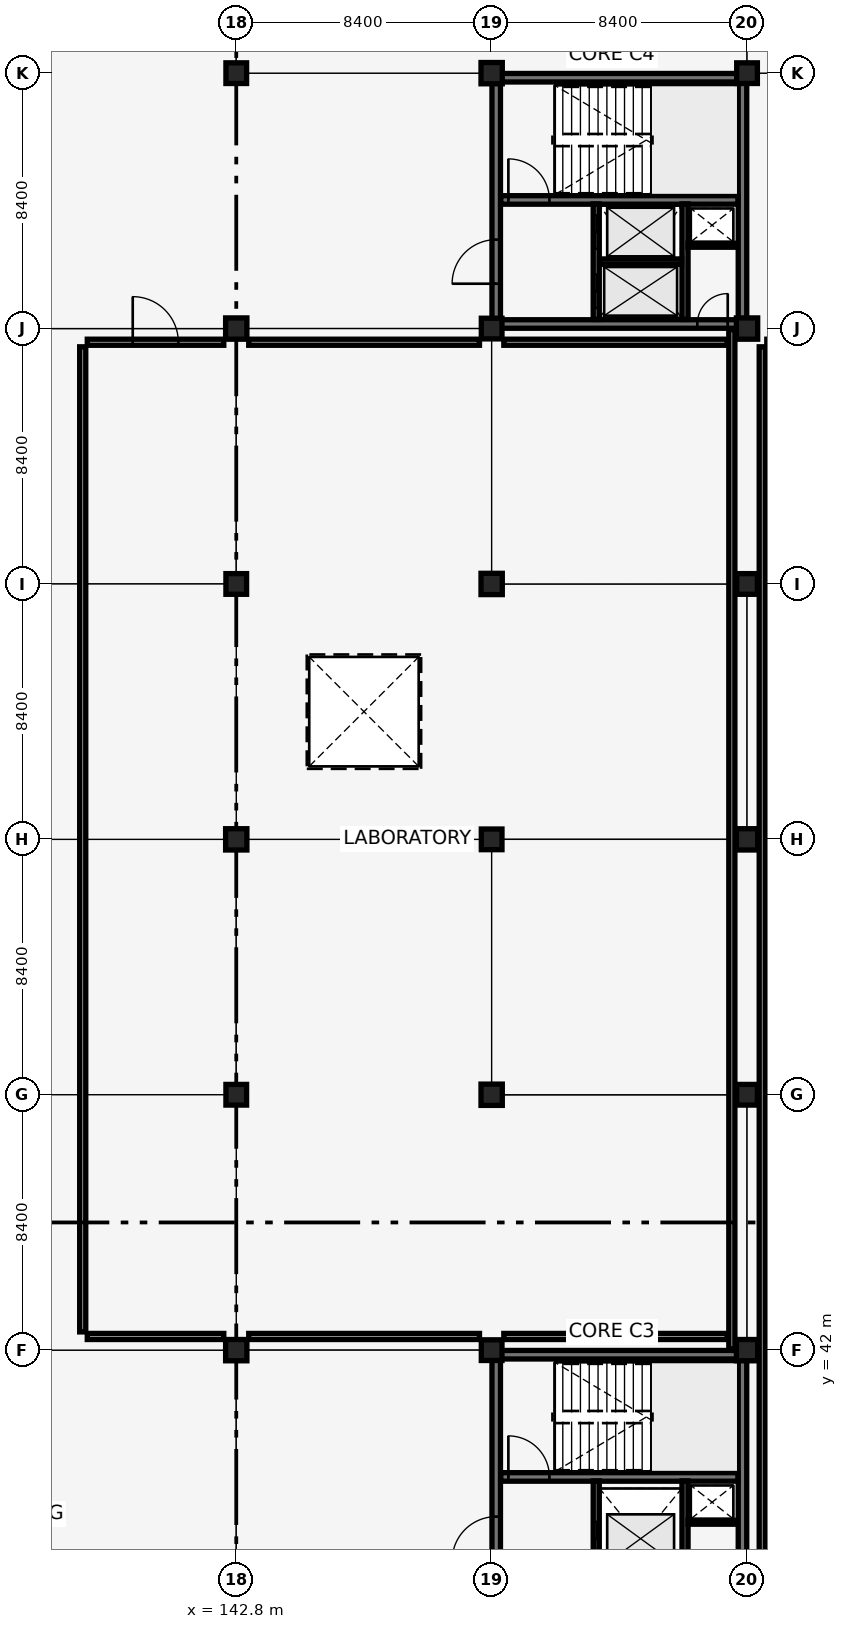
"""IFC4 building model, lengths in metres.
Left out: names, types, materials, properties, quantities, classifications, styles, units other than length and angle.
Written with IfcOpenShell. Run it as: python <this file> out.ifc"""

import sys

from ifc_helpers import new_model, si_unit, direction, frame, frame_2d, origin, origin_2d, place, context, subcontext, project, spatial, rectangle, extrude, element, fill, save


model = new_model("IFC4")
c1 = context("Model", 3, precision=1e-05, world=origin(), true_north=direction((0.0, 1.0)))
c2 = subcontext(c1, "Body", "Model", "MODEL_VIEW")
j1 = project(units=[si_unit("LENGTHUNIT", "METRE"), si_unit("PLANEANGLEUNIT", "RADIAN")], contexts=[c1])
p1 = place(None, origin())
s1 = spatial("IfcSite", under=j1, at=p1, CompositionType="ELEMENT")
p2 = place(p1, origin())
s2 = spatial("IfcBuilding", under=s1, at=p2, CompositionType="ELEMENT")
p3 = place(p2, frame((0.0, 0.0, 9.86)))
s3 = spatial("IfcBuildingStorey", under=s2, at=p3, CompositionType="ELEMENT", Elevation=9.86)
p4 = place(p3, frame((151.35, 41.85, 0.0), z_axis=(0.0, 0.0, 1.0), x_axis=(1.0, 0.0, 0.0)))
e1 = element("IfcWall", 1, at=p4, inside=s3, PredefinedType="SHEAR", context=c2, shape_type="SweptSolid", body=[
    extrude(rectangle(XDim=8.1, YDim=0.28, at=frame_2d((4.05, 0.0))), origin(), (0.0, 0.0, 1.0), 3.78),
])
p5 = place(p3, frame((151.35, 33.75, 0.0), z_axis=(0.0, 0.0, 1.0), x_axis=(0.0, 1.0, 0.0)))
e2 = element("IfcWall", 2, at=p5, inside=s3, PredefinedType="SHEAR", context=c2, shape_type="SweptSolid", body=[
    extrude(rectangle(XDim=8.1, YDim=0.28, at=frame_2d((4.05, 0.0))), origin(), (0.0, 0.0, 1.0), 3.78),
])
p6 = place(p5, frame((1.325, 0.0, 0.0)))
e3 = element("IfcOpeningElement", 3, at=p6, cuts=e2, PredefinedType="OPENING", context=c2, shape_type="SweptSolid", body=[
    extrude(rectangle(XDim=1.45, YDim=2.15, at=frame_2d((0.725, 1.075))), frame((0.0, 0.15, 0.0), z_axis=(0.0, -1.0, 0.0), x_axis=(1.0, 0.0, 0.0)), (0.0, 0.0, 1.0), 0.3),
])
p7 = place(p3, frame((159.45, 33.75, 0.0), z_axis=(0.0, 0.0, 1.0), x_axis=(0.0, 1.0, 0.0)))
e4 = element("IfcWall", 4, at=p7, inside=s3, PredefinedType="SHEAR", context=c2, shape_type="SweptSolid", body=[
    extrude(rectangle(XDim=8.1, YDim=0.28, at=frame_2d((4.05, 0.0))), origin(), (0.0, 0.0, 1.0), 3.78),
])
p8 = place(p3, frame((151.5, 37.83, 0.0), z_axis=(0.0, 0.0, 1.0), x_axis=(1.0, 0.0, 0.0)))
e5 = element("IfcWall", 5, at=p8, inside=s3, PredefinedType="SHEAR", context=c2, shape_type="SweptSolid", body=[
    extrude(rectangle(XDim=7.8, YDim=0.28, at=frame_2d((3.9, 0.0))), origin(), (0.0, 0.0, 1.0), 3.78),
])
p9 = place(p8, frame((0.25, 0.0, 0.0)))
e6 = element("IfcOpeningElement", 6, at=p9, cuts=e5, PredefinedType="OPENING", context=c2, shape_type="SweptSolid", body=[
    extrude(rectangle(XDim=1.35, YDim=2.15, at=frame_2d((0.675, 1.075))), frame((0.0, 0.15, 0.0), z_axis=(0.0, -1.0, 0.0), x_axis=(1.0, 0.0, 0.0)), (0.0, 0.0, 1.0), 0.3),
])
p10 = place(p3, frame((151.35, 75.75, 0.0), z_axis=(0.0, 0.0, 1.0), x_axis=(1.0, 0.0, 0.0)))
e7 = element("IfcWall", 7, at=p10, inside=s3, PredefinedType="SHEAR", context=c2, shape_type="SweptSolid", body=[
    extrude(rectangle(XDim=8.1, YDim=0.28, at=frame_2d((4.05, 0.0))), origin(), (0.0, 0.0, 1.0), 3.78),
])
p11 = place(p10, frame((6.615, 0.0, 0.0)))
e8 = element("IfcOpeningElement", 8, at=p11, cuts=e7, PredefinedType="OPENING", context=c2, shape_type="SweptSolid", body=[
    extrude(rectangle(XDim=1.0, YDim=2.15, at=frame_2d((0.5, 1.075))), frame((0.0, 0.15, 0.0), z_axis=(0.0, -1.0, 0.0), x_axis=(1.0, 0.0, 0.0)), (0.0, 0.0, 1.0), 0.3),
])
p12 = place(p3, frame((151.35, 83.85, 0.0), z_axis=(0.0, 0.0, 1.0), x_axis=(1.0, 0.0, 0.0)))
e9 = element("IfcWall", 9, at=p12, inside=s3, PredefinedType="SHEAR", context=c2, shape_type="SweptSolid", body=[
    extrude(rectangle(XDim=8.1, YDim=0.28, at=frame_2d((4.05, 0.0))), origin(), (0.0, 0.0, 1.0), 3.78),
])
p13 = place(p3, frame((151.35, 75.75, 0.0), z_axis=(0.0, 0.0, 1.0), x_axis=(0.0, 1.0, 0.0)))
e10 = element("IfcWall", 10, at=p13, inside=s3, PredefinedType="SHEAR", context=c2, shape_type="SweptSolid", body=[
    extrude(rectangle(XDim=8.1, YDim=0.28, at=frame_2d((4.05, 0.0))), origin(), (0.0, 0.0, 1.0), 3.78),
])
p14 = place(p13, frame((1.325, 0.0, 0.0)))
e11 = element("IfcOpeningElement", 11, at=p14, cuts=e10, PredefinedType="OPENING", context=c2, shape_type="SweptSolid", body=[
    extrude(rectangle(XDim=1.45, YDim=2.15, at=frame_2d((0.725, 1.075))), frame((0.0, 0.15, 0.0), z_axis=(0.0, -1.0, 0.0), x_axis=(1.0, 0.0, 0.0)), (0.0, 0.0, 1.0), 0.3),
])
p15 = place(p3, frame((159.45, 75.75, 0.0), z_axis=(0.0, 0.0, 1.0), x_axis=(0.0, 1.0, 0.0)))
e12 = element("IfcWall", 12, at=p15, inside=s3, PredefinedType="SHEAR", context=c2, shape_type="SweptSolid", body=[
    extrude(rectangle(XDim=8.1, YDim=0.28, at=frame_2d((4.05, 0.0))), origin(), (0.0, 0.0, 1.0), 3.78),
])
p16 = place(p3, frame((151.5, 79.83, 0.0), z_axis=(0.0, 0.0, 1.0), x_axis=(1.0, 0.0, 0.0)))
e13 = element("IfcWall", 13, at=p16, inside=s3, PredefinedType="SHEAR", context=c2, shape_type="SweptSolid", body=[
    extrude(rectangle(XDim=7.8, YDim=0.28, at=frame_2d((3.9, 0.0))), origin(), (0.0, 0.0, 1.0), 3.78),
])
p17 = place(p16, frame((0.25, 0.0, 0.0)))
e14 = element("IfcOpeningElement", 14, at=p17, cuts=e13, PredefinedType="OPENING", context=c2, shape_type="SweptSolid", body=[
    extrude(rectangle(XDim=1.35, YDim=2.15, at=frame_2d((0.675, 1.075))), frame((0.0, 0.15, 0.0), z_axis=(0.0, -1.0, 0.0), x_axis=(1.0, 0.0, 0.0)), (0.0, 0.0, 1.0), 0.3),
])
p18 = place(p3, frame((142.8, 42.0, 0.0), z_axis=(0.0, 0.0, 1.0), x_axis=(1.0, 0.0, 0.0)))
e15 = element("IfcColumn", 15, at=p18, inside=s3, PredefinedType="COLUMN", context=c2, shape_type="SweptSolid", body=[
    extrude(rectangle(XDim=0.7, YDim=0.7, at=origin_2d()), origin(), (0.0, 0.0, 1.0), 3.78),
])
p19 = place(p3, frame((142.8, 50.4, 0.0), z_axis=(0.0, 0.0, 1.0), x_axis=(1.0, 0.0, 0.0)))
e16 = element("IfcColumn", 16, at=p19, inside=s3, PredefinedType="COLUMN", context=c2, shape_type="SweptSolid", body=[
    extrude(rectangle(XDim=0.68, YDim=0.68, at=origin_2d()), origin(), (0.0, 0.0, 1.0), 3.78),
])
p20 = place(p3, frame((142.8, 58.8, 0.0), z_axis=(0.0, 0.0, 1.0), x_axis=(1.0, 0.0, 0.0)))
e17 = element("IfcColumn", 17, at=p20, inside=s3, PredefinedType="COLUMN", context=c2, shape_type="SweptSolid", body=[
    extrude(rectangle(XDim=0.7, YDim=0.7, at=origin_2d()), origin(), (0.0, 0.0, 1.0), 3.78),
])
p21 = place(p3, frame((142.8, 67.2, 0.0), z_axis=(0.0, 0.0, 1.0), x_axis=(1.0, 0.0, 0.0)))
e18 = element("IfcColumn", 18, at=p21, inside=s3, PredefinedType="COLUMN", context=c2, shape_type="SweptSolid", body=[
    extrude(rectangle(XDim=0.68, YDim=0.68, at=origin_2d()), origin(), (0.0, 0.0, 1.0), 3.78),
])
p22 = place(p3, frame((142.8, 75.6, 0.0), z_axis=(0.0, 0.0, 1.0), x_axis=(1.0, 0.0, 0.0)))
e19 = element("IfcColumn", 19, at=p22, inside=s3, PredefinedType="COLUMN", context=c2, shape_type="SweptSolid", body=[
    extrude(rectangle(XDim=0.7, YDim=0.7, at=origin_2d()), origin(), (0.0, 0.0, 1.0), 3.78),
])
for number, where, z_axis, x_axis in (
    (20, (142.8, 84.0, 0.0), (0.0, 0.0, 1.0), (1.0, 0.0, 0.0)),
    (21, (151.2, 42.0, 0.0), (0.0, 0.0, 1.0), (1.0, 0.0, 0.0)),
):
    element("IfcColumn", number, at=place(p3, frame(where, z_axis=z_axis, x_axis=x_axis)), inside=s3, PredefinedType="COLUMN", context=c2, shape_type="SweptSolid", body=[
        extrude(rectangle(XDim=0.68, YDim=0.68, at=origin_2d()), origin(), (0.0, 0.0, 1.0), 3.78),
    ])
p23 = place(p3, frame((151.2, 50.4, 0.0), z_axis=(0.0, 0.0, 1.0), x_axis=(1.0, 0.0, 0.0)))
e22 = element("IfcColumn", 22, at=p23, inside=s3, PredefinedType="COLUMN", context=c2, shape_type="SweptSolid", body=[
    extrude(rectangle(XDim=0.7, YDim=0.7, at=origin_2d()), origin(), (0.0, 0.0, 1.0), 3.78),
])
p24 = place(p3, frame((151.2, 58.8, 0.0), z_axis=(0.0, 0.0, 1.0), x_axis=(1.0, 0.0, 0.0)))
e23 = element("IfcColumn", 23, at=p24, inside=s3, PredefinedType="COLUMN", context=c2, shape_type="SweptSolid", body=[
    extrude(rectangle(XDim=0.68, YDim=0.68, at=origin_2d()), origin(), (0.0, 0.0, 1.0), 3.78),
])
p25 = place(p3, frame((151.2, 67.2, 0.0), z_axis=(0.0, 0.0, 1.0), x_axis=(1.0, 0.0, 0.0)))
e24 = element("IfcColumn", 24, at=p25, inside=s3, PredefinedType="COLUMN", context=c2, shape_type="SweptSolid", body=[
    extrude(rectangle(XDim=0.7, YDim=0.7, at=origin_2d()), origin(), (0.0, 0.0, 1.0), 3.78),
])
p26 = place(p3, frame((151.2, 75.6, 0.0), z_axis=(0.0, 0.0, 1.0), x_axis=(1.0, 0.0, 0.0)))
e25 = element("IfcColumn", 25, at=p26, inside=s3, PredefinedType="COLUMN", context=c2, shape_type="SweptSolid", body=[
    extrude(rectangle(XDim=0.68, YDim=0.68, at=origin_2d()), origin(), (0.0, 0.0, 1.0), 3.78),
])
for number, where, z_axis, x_axis in (
    (26, (151.2, 84.0, 0.0), (0.0, 0.0, 1.0), (1.0, 0.0, 0.0)),
    (27, (159.6, 42.0, 0.0), (0.0, 0.0, 1.0), (1.0, 0.0, 0.0)),
):
    element("IfcColumn", number, at=place(p3, frame(where, z_axis=z_axis, x_axis=x_axis)), inside=s3, PredefinedType="COLUMN", context=c2, shape_type="SweptSolid", body=[
        extrude(rectangle(XDim=0.7, YDim=0.7, at=origin_2d()), origin(), (0.0, 0.0, 1.0), 3.78),
    ])
p27 = place(p3, frame((159.6, 50.4, 0.0), z_axis=(0.0, 0.0, 1.0), x_axis=(1.0, 0.0, 0.0)))
e28 = element("IfcColumn", 28, at=p27, inside=s3, PredefinedType="COLUMN", context=c2, shape_type="SweptSolid", body=[
    extrude(rectangle(XDim=0.68, YDim=0.68, at=origin_2d()), origin(), (0.0, 0.0, 1.0), 3.78),
])
p28 = place(p3, frame((159.6, 58.8, 0.0), z_axis=(0.0, 0.0, 1.0), x_axis=(1.0, 0.0, 0.0)))
e29 = element("IfcColumn", 29, at=p28, inside=s3, PredefinedType="COLUMN", context=c2, shape_type="SweptSolid", body=[
    extrude(rectangle(XDim=0.7, YDim=0.7, at=origin_2d()), origin(), (0.0, 0.0, 1.0), 3.78),
])
p29 = place(p3, frame((159.6, 67.2, 0.0), z_axis=(0.0, 0.0, 1.0), x_axis=(1.0, 0.0, 0.0)))
e30 = element("IfcColumn", 30, at=p29, inside=s3, PredefinedType="COLUMN", context=c2, shape_type="SweptSolid", body=[
    extrude(rectangle(XDim=0.68, YDim=0.68, at=origin_2d()), origin(), (0.0, 0.0, 1.0), 3.78),
])
p30 = place(p3, frame((159.6, 75.6, 0.0), z_axis=(0.0, 0.0, 1.0), x_axis=(1.0, 0.0, 0.0)))
e31 = element("IfcColumn", 31, at=p30, inside=s3, PredefinedType="COLUMN", context=c2, shape_type="SweptSolid", body=[
    extrude(rectangle(XDim=0.7, YDim=0.7, at=origin_2d()), origin(), (0.0, 0.0, 1.0), 3.78),
])
p31 = place(p3, frame((159.6, 84.0, 0.0), z_axis=(0.0, 0.0, 1.0), x_axis=(1.0, 0.0, 0.0)))
e32 = element("IfcColumn", 32, at=p31, inside=s3, PredefinedType="COLUMN", context=c2, shape_type="SweptSolid", body=[
    extrude(rectangle(XDim=0.68, YDim=0.68, at=origin_2d()), origin(), (0.0, 0.0, 1.0), 3.78),
])
p32 = place(p3, frame((154.64, 33.9, 0.0), z_axis=(0.0, 0.0, 1.0), x_axis=(0.0, 1.0, 0.0)))
e33 = element("IfcWall", 33, at=p32, inside=s3, PredefinedType="SHEAR", context=c2, shape_type="SweptSolid", body=[
    extrude(rectangle(XDim=3.8, YDim=0.2, at=frame_2d((1.9, 0.0))), origin(), (0.0, 0.0, 1.0), 2.91),
])
p33 = place(p32, frame((1.35, 0.0, 0.0)))
e34 = element("IfcOpeningElement", 34, at=p33, cuts=e33, PredefinedType="OPENING", context=c2, shape_type="SweptSolid", body=[
    extrude(rectangle(XDim=1.1, YDim=2.15, at=frame_2d((0.55, 1.075))), frame((0.0, 0.11, 0.0), z_axis=(0.0, -1.0, 0.0), x_axis=(1.0, 0.0, 0.0)), (0.0, 0.0, 1.0), 0.22),
])
p34 = place(p3, frame((157.56, 33.9, 0.0), z_axis=(0.0, 0.0, 1.0), x_axis=(0.0, 1.0, 0.0)))
e35 = element("IfcWall", 35, at=p34, inside=s3, PredefinedType="SHEAR", context=c2, shape_type="SweptSolid", body=[
    extrude(rectangle(XDim=3.8, YDim=0.2, at=frame_2d((1.9, 0.0))), origin(), (0.0, 0.0, 1.0), 2.91),
])
p35 = place(p3, frame((157.66, 36.34, 0.0), z_axis=(0.0, 0.0, 1.0), x_axis=(1.0, 0.0, 0.0)))
e36 = element("IfcWall", 36, at=p35, inside=s3, PredefinedType="PARTITIONING", context=c2, shape_type="SweptSolid", body=[
    extrude(rectangle(XDim=1.62, YDim=0.13, at=frame_2d((0.81, 0.0))), origin(), (0.0, 0.0, 1.0), 3.78),
])
p36 = place(p3, frame((154.64, 75.9, 0.0), z_axis=(0.0, 0.0, 1.0), x_axis=(0.0, 1.0, 0.0)))
e37 = element("IfcWall", 37, at=p36, inside=s3, PredefinedType="SHEAR", context=c2, shape_type="SweptSolid", body=[
    extrude(rectangle(XDim=3.8, YDim=0.2, at=frame_2d((1.9, 0.0))), origin(), (0.0, 0.0, 1.0), 2.95),
])
p37 = place(p36, frame((0.375, 0.0, 0.0)))
e38 = element("IfcOpeningElement", 38, at=p37, cuts=e37, PredefinedType="OPENING", context=c2, shape_type="SweptSolid", body=[
    extrude(rectangle(XDim=1.1, YDim=2.15, at=frame_2d((0.55, 1.075))), frame((0.0, 0.11, 0.0), z_axis=(0.0, -1.0, 0.0), x_axis=(1.0, 0.0, 0.0)), (0.0, 0.0, 1.0), 0.22),
])
p38 = place(p36, frame((2.325, 0.0, 0.0)))
e39 = element("IfcOpeningElement", 39, at=p38, cuts=e37, PredefinedType="OPENING", context=c2, shape_type="SweptSolid", body=[
    extrude(rectangle(XDim=1.1, YDim=2.15, at=frame_2d((0.55, 1.075))), frame((0.0, 0.11, 0.0), z_axis=(0.0, -1.0, 0.0), x_axis=(1.0, 0.0, 0.0)), (0.0, 0.0, 1.0), 0.22),
])
p39 = place(p3, frame((157.56, 75.9, 0.0), z_axis=(0.0, 0.0, 1.0), x_axis=(0.0, 1.0, 0.0)))
e40 = element("IfcWall", 40, at=p39, inside=s3, PredefinedType="SHEAR", context=c2, shape_type="SweptSolid", body=[
    extrude(rectangle(XDim=3.8, YDim=0.2, at=frame_2d((1.9, 0.0))), origin(), (0.0, 0.0, 1.0), 2.95),
])
p40 = place(p3, frame((154.75, 77.8, 0.0), z_axis=(0.0, 0.0, 1.0), x_axis=(1.0, 0.0, 0.0)))
e41 = element("IfcWall", 41, at=p40, inside=s3, PredefinedType="SHEAR", context=c2, shape_type="SweptSolid", body=[
    extrude(rectangle(XDim=2.7, YDim=0.18, at=frame_2d((1.35, 0.0))), origin(), (0.0, 0.0, 1.0), 3.78),
])
p41 = place(p3, frame((157.66, 78.34, 0.0), z_axis=(0.0, 0.0, 1.0), x_axis=(1.0, 0.0, 0.0)))
e42 = element("IfcWall", 42, at=p41, inside=s3, PredefinedType="PARTITIONING", context=c2, shape_type="SweptSolid", body=[
    extrude(rectangle(XDim=1.62, YDim=0.13, at=frame_2d((0.81, 0.0))), origin(), (0.0, 0.0, 1.0), 3.78),
])
p42 = place(p3, frame((137.9, 75.15, 0.0), z_axis=(0.0, 0.0, 1.0), x_axis=(1.0, 0.0, 0.0)))
e43 = element("IfcWall", 43, at=p42, inside=s3, PredefinedType="PARTITIONING", context=c2, shape_type="SweptSolid", body=[
    extrude(rectangle(XDim=4.49, YDim=0.2, at=frame_2d((2.245, 0.0))), origin(), (0.0, 0.0, 1.0), 3.78),
])
p43 = place(p42, frame((1.495, 0.0, 0.0)))
e44 = element("IfcOpeningElement", 44, at=p43, cuts=e43, PredefinedType="OPENING", context=c2, shape_type="SweptSolid", body=[
    extrude(rectangle(XDim=1.5, YDim=2.2, at=frame_2d((0.75, 1.1))), frame((0.0, 0.11, 0.0), z_axis=(0.0, -1.0, 0.0), x_axis=(1.0, 0.0, 0.0)), (0.0, 0.0, 1.0), 0.22),
])
p44 = place(p3, frame((143.21, 75.15, 0.0), z_axis=(0.0, 0.0, 1.0), x_axis=(1.0, 0.0, 0.0)))
e45 = element("IfcWall", 45, at=p44, inside=s3, PredefinedType="PARTITIONING", context=c2, shape_type="SweptSolid", body=[
    extrude(rectangle(XDim=7.59, YDim=0.2, at=frame_2d((3.795, 0.0))), origin(), (0.0, 0.0, 1.0), 3.78),
])
p45 = place(p3, frame((151.6, 75.15, 0.0), z_axis=(0.0, 0.0, 1.0), x_axis=(1.0, 0.0, 0.0)))
e46 = element("IfcWall", 46, at=p45, inside=s3, PredefinedType="PARTITIONING", context=c2, shape_type="SweptSolid", body=[
    extrude(rectangle(XDim=7.35, YDim=0.2, at=frame_2d((3.675, 0.0))), origin(), (0.0, 0.0, 1.0), 3.78),
])
p46 = place(p3, frame((137.75, 42.6, 0.0), z_axis=(0.0, 0.0, 1.0), x_axis=(0.0, 1.0, 0.0)))
e47 = element("IfcWall", 47, at=p46, inside=s3, PredefinedType="PARTITIONING", context=c2, shape_type="SweptSolid", body=[
    extrude(rectangle(XDim=32.4, YDim=0.2, at=frame_2d((16.2, 0.0))), origin(), (0.0, 0.0, 1.0), 2.91),
])
p47 = place(p3, frame((137.9, 42.45, 0.0), z_axis=(0.0, 0.0, 1.0), x_axis=(1.0, 0.0, 0.0)))
e48 = element("IfcWall", 48, at=p47, inside=s3, PredefinedType="PARTITIONING", context=c2, shape_type="SweptSolid", body=[
    extrude(rectangle(XDim=4.49, YDim=0.2, at=frame_2d((2.245, 0.0))), origin(), (0.0, 0.0, 1.0), 3.78),
])
p48 = place(p3, frame((143.21, 42.45, 0.0), z_axis=(0.0, 0.0, 1.0), x_axis=(1.0, 0.0, 0.0)))
e49 = element("IfcWall", 49, at=p48, inside=s3, PredefinedType="PARTITIONING", context=c2, shape_type="SweptSolid", body=[
    extrude(rectangle(XDim=7.59, YDim=0.2, at=frame_2d((3.795, 0.0))), origin(), (0.0, 0.0, 1.0), 3.78),
])
p49 = place(p3, frame((151.6, 42.45, 0.0), z_axis=(0.0, 0.0, 1.0), x_axis=(1.0, 0.0, 0.0)))
e50 = element("IfcWall", 50, at=p49, inside=s3, PredefinedType="PARTITIONING", context=c2, shape_type="SweptSolid", body=[
    extrude(rectangle(XDim=7.35, YDim=0.2, at=frame_2d((3.675, 0.0))), origin(), (0.0, 0.0, 1.0), 3.78),
])
p50 = place(p3, frame((159.1, 42.03, 0.0), z_axis=(0.0, 0.0, 1.0), x_axis=(0.0, 1.0, 0.0)))
e51 = element("IfcWall", 51, at=p50, inside=s3, PredefinedType="PARTITIONING", context=c2, shape_type="SweptSolid", body=[
    extrude(rectangle(XDim=33.54, YDim=0.2, at=frame_2d((16.77, 0.0))), origin(), (0.0, 0.0, 1.0), 2.91),
])
p51 = place(p3, frame((160.25, 75.15, 0.0), z_axis=(0.0, 0.0, 1.0), x_axis=(1.0, 0.0, 0.0)))
e52 = element("IfcWall", 52, at=p51, inside=s3, PredefinedType="PARTITIONING", context=c2, shape_type="SweptSolid", body=[
    extrude(rectangle(XDim=7.57, YDim=0.2, at=frame_2d((3.785, 0.0))), origin(), (0.0, 0.0, 1.0), 3.0),
])
p52 = place(p3, frame((160.1, 34.2, 0.0), z_axis=(0.0, 0.0, 1.0), x_axis=(0.0, 1.0, 0.0)))
e53 = element("IfcWall", 53, at=p52, inside=s3, PredefinedType="PARTITIONING", context=c2, shape_type="SweptSolid", body=[
    extrude(rectangle(XDim=40.8, YDim=0.2, at=frame_2d((20.4, 0.0))), origin(), (0.0, 0.0, 1.0), 2.91),
])
p53 = place(p9, origin())
e54 = element("IfcDoor", 54, at=p53, inside=s3, OperationType="SINGLE_SWING_LEFT", PredefinedType="DOOR", context=c2, shape_type="SweptSolid", body=[
    extrude(rectangle(XDim=1.35, YDim=2.15, at=frame_2d((0.675, 1.075))), frame((0.0, 0.025, 0.0), z_axis=(0.0, -1.0, 0.0), x_axis=(1.0, 0.0, 0.0)), (0.0, 0.0, 1.0), 0.05),
])
fill(e6, e54)
p54 = place(p33, origin())
e55 = element("IfcDoor", 55, at=p54, inside=s3, OperationType="SLIDING_TO_LEFT", PredefinedType="DOOR", context=c2, shape_type="SweptSolid", body=[
    extrude(rectangle(XDim=1.1, YDim=2.15, at=frame_2d((0.55, 1.075))), frame((0.0, 0.025, 0.0), z_axis=(0.0, -1.0, 0.0), x_axis=(1.0, 0.0, 0.0)), (0.0, 0.0, 1.0), 0.05),
])
fill(e34, e55)
p55 = place(p6, origin())
e56 = element("IfcDoor", 56, at=p55, inside=s3, OperationType="DOUBLE_DOOR_SINGLE_SWING", PredefinedType="DOOR", context=c2, shape_type="SweptSolid", body=[
    extrude(rectangle(XDim=1.45, YDim=2.15, at=frame_2d((0.725, 1.075))), frame((0.0, 0.025, 0.0), z_axis=(0.0, -1.0, 0.0), x_axis=(1.0, 0.0, 0.0)), (0.0, 0.0, 1.0), 0.05),
])
fill(e3, e56)
p56 = place(p17, origin())
e57 = element("IfcDoor", 57, at=p56, inside=s3, OperationType="SINGLE_SWING_LEFT", PredefinedType="DOOR", context=c2, shape_type="SweptSolid", body=[
    extrude(rectangle(XDim=1.35, YDim=2.15, at=frame_2d((0.675, 1.075))), frame((0.0, 0.025, 0.0), z_axis=(0.0, -1.0, 0.0), x_axis=(1.0, 0.0, 0.0)), (0.0, 0.0, 1.0), 0.05),
])
fill(e14, e57)
p57 = place(p37, origin())
e58 = element("IfcDoor", 58, at=p57, inside=s3, OperationType="SLIDING_TO_LEFT", PredefinedType="DOOR", context=c2, shape_type="SweptSolid", body=[
    extrude(rectangle(XDim=1.1, YDim=2.15, at=frame_2d((0.55, 1.075))), frame((0.0, 0.025, 0.0), z_axis=(0.0, -1.0, 0.0), x_axis=(1.0, 0.0, 0.0)), (0.0, 0.0, 1.0), 0.05),
])
fill(e38, e58)
p58 = place(p38, origin())
e59 = element("IfcDoor", 59, at=p58, inside=s3, OperationType="SLIDING_TO_LEFT", PredefinedType="DOOR", context=c2, shape_type="SweptSolid", body=[
    extrude(rectangle(XDim=1.1, YDim=2.15, at=frame_2d((0.55, 1.075))), frame((0.0, 0.025, 0.0), z_axis=(0.0, -1.0, 0.0), x_axis=(1.0, 0.0, 0.0)), (0.0, 0.0, 1.0), 0.05),
])
fill(e39, e59)
p59 = place(p14, origin())
e60 = element("IfcDoor", 60, at=p59, inside=s3, OperationType="DOUBLE_DOOR_SINGLE_SWING", PredefinedType="DOOR", context=c2, shape_type="SweptSolid", body=[
    extrude(rectangle(XDim=1.45, YDim=2.15, at=frame_2d((0.725, 1.075))), frame((0.0, 0.025, 0.0), z_axis=(0.0, -1.0, 0.0), x_axis=(1.0, 0.0, 0.0)), (0.0, 0.0, 1.0), 0.05),
])
fill(e11, e60)
p60 = place(p11, origin())
e61 = element("IfcDoor", 61, at=p60, inside=s3, OperationType="SINGLE_SWING_RIGHT", PredefinedType="DOOR", context=c2, shape_type="SweptSolid", body=[
    extrude(rectangle(XDim=1.0, YDim=2.15, at=frame_2d((0.5, 1.075))), frame((0.0, 0.025, 0.0), z_axis=(0.0, -1.0, 0.0), x_axis=(1.0, 0.0, 0.0)), (0.0, 0.0, 1.0), 0.05),
])
fill(e8, e61)
p61 = place(p43, origin())
e62 = element("IfcDoor", 62, at=p61, inside=s3, OperationType="DOUBLE_DOOR_SINGLE_SWING", PredefinedType="DOOR", context=c2, shape_type="SweptSolid", body=[
    extrude(rectangle(XDim=1.5, YDim=2.2, at=frame_2d((0.75, 1.1))), frame((0.0, 0.025, 0.0), z_axis=(0.0, -1.0, 0.0), x_axis=(1.0, 0.0, 0.0)), (0.0, 0.0, 1.0), 0.05),
])
fill(e44, e62)
save(model, sys.argv[1])
